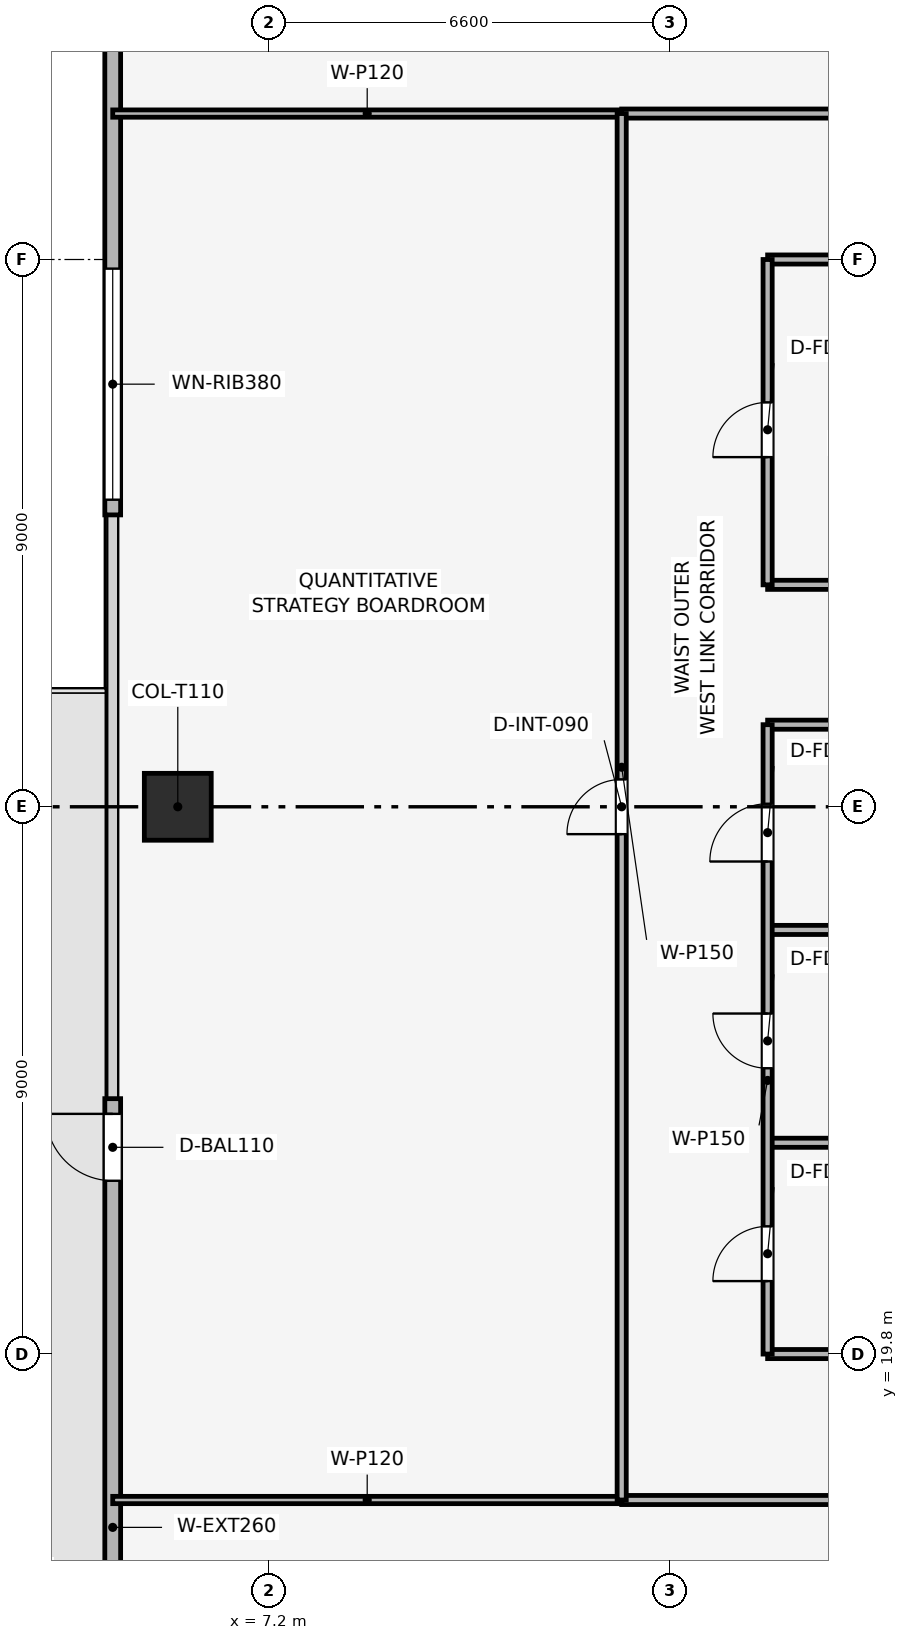
"""IFC4 building model, lengths in metres.
Left out: names, types, materials, properties, quantities, classifications, styles, units other than length and angle.
Written with IfcOpenShell. Run it as: python <this file> out.ifc"""

import sys

from ifc_helpers import new_model, si_unit, direction, frame, frame_2d, origin, origin_2d, place, context, subcontext, project, spatial, rectangle, extrude, element, fill, save


model = new_model("IFC4")
c1 = context("Model", 3, precision=1e-05, world=origin(), true_north=direction((0.0, 1.0)))
c2 = subcontext(c1, "Body", "Model", "MODEL_VIEW")
j1 = project(units=[si_unit("LENGTHUNIT", "METRE"), si_unit("PLANEANGLEUNIT", "RADIAN")], contexts=[c1])
p1 = place(None, origin())
s1 = spatial("IfcSite", under=j1, at=p1, CompositionType="ELEMENT")
p2 = place(p1, origin())
s2 = spatial("IfcBuilding", under=s1, at=p2, CompositionType="ELEMENT")
p3 = place(p2, frame((0.0, 0.0, 175.8)))
s3 = spatial("IfcBuildingStorey", under=s2, at=p3, CompositionType="ELEMENT", Elevation=175.8)
p4 = place(p3, frame((5.7, 28.8, 0.003), z_axis=(0.0, 0.0, 1.0), x_axis=(1.0, 0.0, 0.0)))
e1 = element("IfcColumn", 1, at=p4, inside=s3, PredefinedType="COLUMN", context=c2, shape_type="SweptSolid", body=[
    extrude(rectangle(XDim=1.1, YDim=1.1, at=origin_2d()), origin(), (0.0, 0.0, 1.0), 3.489),
])
p5 = place(p3, frame((4.63, 11.4, 0.0), z_axis=(0.0, 0.0, 1.0), x_axis=(0.0, 1.0, 0.0)))
e2 = element("IfcWall", 2, at=p5, inside=s3, PredefinedType="SOLIDWALL", context=c2, shape_type="SweptSolid", body=[
    extrude(rectangle(XDim=12.6, YDim=0.26, at=frame_2d((6.3, 0.0))), origin(), (0.0, 0.0, 1.0), 3.495),
])
p6 = place(p5, frame((11.25, 0.0, 0.0)))
e3 = element("IfcOpeningElement", 3, at=p6, cuts=e2, PredefinedType="OPENING", context=c2, shape_type="SweptSolid", body=[
    extrude(rectangle(XDim=1.1, YDim=2.2, at=frame_2d((0.55, 1.1))), frame((0.0, 0.14, 0.0), z_axis=(0.0, -1.0, 0.0), x_axis=(1.0, 0.0, 0.0)), (0.0, 0.0, 1.0), 0.28),
])
p7 = place(p3, frame((4.63, 33.6, 0.0), z_axis=(0.0, 0.0, 1.0), x_axis=(0.0, 1.0, 0.0)))
e4 = element("IfcWall", 4, at=p7, inside=s3, PredefinedType="SOLIDWALL", context=c2, shape_type="SweptSolid", body=[
    extrude(rectangle(XDim=12.6, YDim=0.26, at=frame_2d((6.3, 0.0))), origin(), (0.0, 0.0, 1.0), 3.495),
])
p8 = place(p7, frame((0.25, 0.0, 0.9)))
e5 = element("IfcOpeningElement", 5, at=p8, cuts=e4, PredefinedType="OPENING", context=c2, shape_type="SweptSolid", body=[
    extrude(rectangle(XDim=3.8, YDim=1.9, at=frame_2d((1.9, 0.95))), frame((0.0, 0.14, 0.0), z_axis=(0.0, -1.0, 0.0), x_axis=(1.0, 0.0, 0.0)), (0.0, 0.0, 1.0), 0.28),
])
p9 = place(p3, frame((15.4, 19.8, 0.0), z_axis=(0.0, 0.0, 1.0), x_axis=(1.0, 0.0, 0.0)))
e6 = element("IfcWall", 6, at=p9, inside=s3, PredefinedType="PARTITIONING", context=c2, shape_type="SweptSolid", body=[
    extrude(rectangle(XDim=4.4, YDim=0.15, at=frame_2d((2.2, 0.0))), origin(), (0.0, 0.0, 1.0), 3.03),
])
for number, where, z_axis, x_axis in (
    (7, (15.4, 23.275, 0.0), (0.0, 0.0, 1.0), (1.0, 0.0, 0.0)),
    (8, (15.4, 26.775, 0.0), (0.0, 0.0, 1.0), (1.0, 0.0, 0.0)),
    (9, (15.4, 30.15, 0.0), (0.0, 0.0, 1.0), (1.0, 0.0, 0.0)),
    (10, (15.4, 32.45, 0.0), (0.0, 0.0, 1.0), (1.0, 0.0, 0.0)),
):
    element("IfcWall", number, at=place(p3, frame(where, z_axis=z_axis, x_axis=x_axis)), inside=s3, PredefinedType="PARTITIONING", context=c2, shape_type="SweptSolid", body=[
        extrude(rectangle(XDim=4.4, YDim=0.15, at=frame_2d((2.2, 0.0))), origin(), (0.0, 0.0, 1.0), 3.495),
    ])
p10 = place(p3, frame((15.4, 37.8, 0.0), z_axis=(0.0, 0.0, 1.0), x_axis=(1.0, 0.0, 0.0)))
e11 = element("IfcWall", 11, at=p10, inside=s3, PredefinedType="PARTITIONING", context=c2, shape_type="SweptSolid", body=[
    extrude(rectangle(XDim=4.4, YDim=0.15, at=frame_2d((2.2, 0.0))), origin(), (0.0, 0.0, 1.0), 3.03),
])
p11 = place(p3, frame((15.4, 19.8, 0.0), z_axis=(0.0, 0.0, 1.0), x_axis=(0.0, 1.0, 0.0)))
e12 = element("IfcWall", 12, at=p11, inside=s3, PredefinedType="PARTITIONING", context=c2, shape_type="SweptSolid", body=[
    extrude(rectangle(XDim=10.35, YDim=0.15, at=frame_2d((5.175, 0.0))), origin(), (0.0, 0.0, 1.0), 3.03),
])
p12 = place(p11, frame((1.2, 0.0, 0.0)))
e13 = element("IfcOpeningElement", 13, at=p12, cuts=e12, PredefinedType="OPENING", context=c2, shape_type="SweptSolid", body=[
    extrude(rectangle(XDim=0.9, YDim=2.1, at=frame_2d((0.45, 1.05))), frame((0.0, 0.085, 0.0), z_axis=(0.0, -1.0, 0.0), x_axis=(1.0, 0.0, 0.0)), (0.0, 0.0, 1.0), 0.17),
])
p13 = place(p11, frame((4.7, 0.0, 0.0)))
e14 = element("IfcOpeningElement", 14, at=p13, cuts=e12, PredefinedType="OPENING", context=c2, shape_type="SweptSolid", body=[
    extrude(rectangle(XDim=0.9, YDim=2.1, at=frame_2d((0.45, 1.05))), frame((0.0, 0.085, 0.0), z_axis=(0.0, -1.0, 0.0), x_axis=(1.0, 0.0, 0.0)), (0.0, 0.0, 1.0), 0.17),
])
p14 = place(p11, frame((8.1, 0.0, 0.0)))
e15 = element("IfcOpeningElement", 15, at=p14, cuts=e12, PredefinedType="OPENING", context=c2, shape_type="SweptSolid", body=[
    extrude(rectangle(XDim=0.95, YDim=2.1, at=frame_2d((0.475, 1.05))), frame((0.0, 0.085, 0.0), z_axis=(0.0, -1.0, 0.0), x_axis=(1.0, 0.0, 0.0)), (0.0, 0.0, 1.0), 0.17),
])
p15 = place(p3, frame((15.4, 32.45, 0.0), z_axis=(0.0, 0.0, 1.0), x_axis=(0.0, 1.0, 0.0)))
e16 = element("IfcWall", 16, at=p15, inside=s3, PredefinedType="PARTITIONING", context=c2, shape_type="SweptSolid", body=[
    extrude(rectangle(XDim=5.35, YDim=0.15, at=frame_2d((2.675, 0.0))), origin(), (0.0, 0.0, 1.0), 3.03),
])
p16 = place(p15, frame((2.1, 0.0, 0.0)))
e17 = element("IfcOpeningElement", 17, at=p16, cuts=e16, PredefinedType="OPENING", context=c2, shape_type="SweptSolid", body=[
    extrude(rectangle(XDim=0.9, YDim=2.1, at=frame_2d((0.45, 1.05))), frame((0.0, 0.085, 0.0), z_axis=(0.0, -1.0, 0.0), x_axis=(1.0, 0.0, 0.0)), (0.0, 0.0, 1.0), 0.17),
])
for number, where, z_axis, x_axis in (
    (18, (4.63, 17.4, 0.0), (0.0, 0.0, 1.0), (1.0, 0.0, 0.0)),
    (19, (4.63, 40.2, 0.0), (0.0, 0.0, 1.0), (1.0, 0.0, 0.0)),
):
    element("IfcWall", number, at=place(p3, frame(where, z_axis=z_axis, x_axis=x_axis)), inside=s3, PredefinedType="PARTITIONING", context=c2, shape_type="SweptSolid", body=[
        extrude(rectangle(XDim=8.37, YDim=0.12, at=frame_2d((4.185, 0.0))), origin(), (0.0, 0.0, 1.0), 2.98),
    ])
p17 = place(p3, frame((13.0, 17.4, 0.0), z_axis=(0.0, 0.0, 1.0), x_axis=(1.0, 0.0, 0.0)))
e20 = element("IfcWall", 20, at=p17, inside=s3, PredefinedType="PARTITIONING", context=c2, shape_type="SweptSolid", body=[
    extrude(rectangle(XDim=31.6, YDim=0.15, at=frame_2d((15.8, 0.0))), origin(), (0.0, 0.0, 1.0), 3.03),
])
p18 = place(p17, frame((15.35, 0.0, 0.0)))
e21 = element("IfcOpeningElement", 21, at=p18, cuts=e20, PredefinedType="OPENING", context=c2, shape_type="SweptSolid", body=[
    extrude(rectangle(XDim=0.9, YDim=2.1, at=frame_2d((0.45, 1.05))), frame((0.0, 0.085, 0.0), z_axis=(0.0, -1.0, 0.0), x_axis=(1.0, 0.0, 0.0)), (0.0, 0.0, 1.0), 0.17),
])
p19 = place(p3, frame((13.0, 40.2, 0.0), z_axis=(0.0, 0.0, 1.0), x_axis=(1.0, 0.0, 0.0)))
e22 = element("IfcWall", 22, at=p19, inside=s3, PredefinedType="PARTITIONING", context=c2, shape_type="SweptSolid", body=[
    extrude(rectangle(XDim=31.6, YDim=0.15, at=frame_2d((15.8, 0.0))), origin(), (0.0, 0.0, 1.0), 3.03),
])
p20 = place(p19, frame((6.775, 0.0, 0.0)))
e23 = element("IfcOpeningElement", 23, at=p20, cuts=e22, PredefinedType="OPENING", context=c2, shape_type="SweptSolid", body=[
    extrude(rectangle(XDim=0.9, YDim=2.1, at=frame_2d((0.45, 1.05))), frame((0.0, 0.085, 0.0), z_axis=(0.0, -1.0, 0.0), x_axis=(1.0, 0.0, 0.0)), (0.0, 0.0, 1.0), 0.17),
])
p21 = place(p19, frame((22.575, 0.0, 0.0)))
e24 = element("IfcOpeningElement", 24, at=p21, cuts=e22, PredefinedType="OPENING", context=c2, shape_type="SweptSolid", body=[
    extrude(rectangle(XDim=0.9, YDim=2.1, at=frame_2d((0.45, 1.05))), frame((0.0, 0.085, 0.0), z_axis=(0.0, -1.0, 0.0), x_axis=(1.0, 0.0, 0.0)), (0.0, 0.0, 1.0), 0.17),
])
p22 = place(p3, frame((13.0, 17.4, 0.0), z_axis=(0.0, 0.0, 1.0), x_axis=(0.0, 1.0, 0.0)))
e25 = element("IfcWall", 25, at=p22, inside=s3, PredefinedType="PARTITIONING", context=c2, shape_type="SweptSolid", body=[
    extrude(rectangle(XDim=22.8, YDim=0.15, at=frame_2d((11.4, 0.0))), origin(), (0.0, 0.0, 1.0), 3.03),
])
p23 = place(p22, frame((10.95, 0.0, 0.0)))
e26 = element("IfcOpeningElement", 26, at=p23, cuts=e25, PredefinedType="OPENING", context=c2, shape_type="SweptSolid", body=[
    extrude(rectangle(XDim=0.9, YDim=2.1, at=frame_2d((0.45, 1.05))), frame((0.0, 0.085, 0.0), z_axis=(0.0, -1.0, 0.0), x_axis=(1.0, 0.0, 0.0)), (0.0, 0.0, 1.0), 0.17),
])
p24 = place(p6, origin())
e27 = element("IfcDoor", 27, at=p24, inside=s3, OperationType="SINGLE_SWING_RIGHT", PredefinedType="DOOR", context=c2, shape_type="SweptSolid", body=[
    extrude(rectangle(XDim=1.1, YDim=2.2, at=frame_2d((0.55, 1.1))), frame((0.0, 0.025, 0.0), z_axis=(0.0, -1.0, 0.0), x_axis=(1.0, 0.0, 0.0)), (0.0, 0.0, 1.0), 0.05),
])
fill(e3, e27)
p25 = place(p8, origin())
e28 = element("IfcWindow", 28, at=p25, inside=s3, PartitioningType="SINGLE_PANEL", PredefinedType="WINDOW", context=c2, shape_type="SweptSolid", body=[
    extrude(rectangle(XDim=3.8, YDim=1.9, at=frame_2d((1.9, 0.95))), frame((0.0, 0.03, 0.0), z_axis=(0.0, -1.0, 0.0), x_axis=(1.0, 0.0, 0.0)), (0.0, 0.0, 1.0), 0.06),
])
fill(e5, e28)
p26 = place(p12, origin())
e29 = element("IfcDoor", 29, at=p26, inside=s3, OperationType="SINGLE_SWING_LEFT", PredefinedType="DOOR", context=c2, shape_type="SweptSolid", body=[
    extrude(rectangle(XDim=0.9, YDim=2.1, at=frame_2d((0.45, 1.05))), frame((0.0, 0.025, 0.0), z_axis=(0.0, -1.0, 0.0), x_axis=(1.0, 0.0, 0.0)), (0.0, 0.0, 1.0), 0.05),
])
fill(e13, e29)
p27 = place(p13, origin())
e30 = element("IfcDoor", 30, at=p27, inside=s3, OperationType="SINGLE_SWING_RIGHT", PredefinedType="DOOR", context=c2, shape_type="SweptSolid", body=[
    extrude(rectangle(XDim=0.9, YDim=2.1, at=frame_2d((0.45, 1.05))), frame((0.0, 0.025, 0.0), z_axis=(0.0, -1.0, 0.0), x_axis=(1.0, 0.0, 0.0)), (0.0, 0.0, 1.0), 0.05),
])
fill(e14, e30)
p28 = place(p14, origin())
e31 = element("IfcDoor", 31, at=p28, inside=s3, OperationType="SINGLE_SWING_LEFT", PredefinedType="DOOR", context=c2, shape_type="SweptSolid", body=[
    extrude(rectangle(XDim=0.95, YDim=2.1, at=frame_2d((0.475, 1.05))), frame((0.0, 0.025, 0.0), z_axis=(0.0, -1.0, 0.0), x_axis=(1.0, 0.0, 0.0)), (0.0, 0.0, 1.0), 0.05),
])
fill(e15, e31)
p29 = place(p16, origin())
e32 = element("IfcDoor", 32, at=p29, inside=s3, OperationType="SINGLE_SWING_LEFT", PredefinedType="DOOR", context=c2, shape_type="SweptSolid", body=[
    extrude(rectangle(XDim=0.9, YDim=2.1, at=frame_2d((0.45, 1.05))), frame((0.0, 0.025, 0.0), z_axis=(0.0, -1.0, 0.0), x_axis=(1.0, 0.0, 0.0)), (0.0, 0.0, 1.0), 0.05),
])
fill(e17, e32)
p30 = place(p23, origin())
e33 = element("IfcDoor", 33, at=p30, inside=s3, OperationType="SINGLE_SWING_LEFT", PredefinedType="DOOR", context=c2, shape_type="SweptSolid", body=[
    extrude(rectangle(XDim=0.9, YDim=2.1, at=frame_2d((0.45, 1.05))), frame((0.0, 0.025, 0.0), z_axis=(0.0, -1.0, 0.0), x_axis=(1.0, 0.0, 0.0)), (0.0, 0.0, 1.0), 0.05),
])
fill(e26, e33)
save(model, sys.argv[1])
